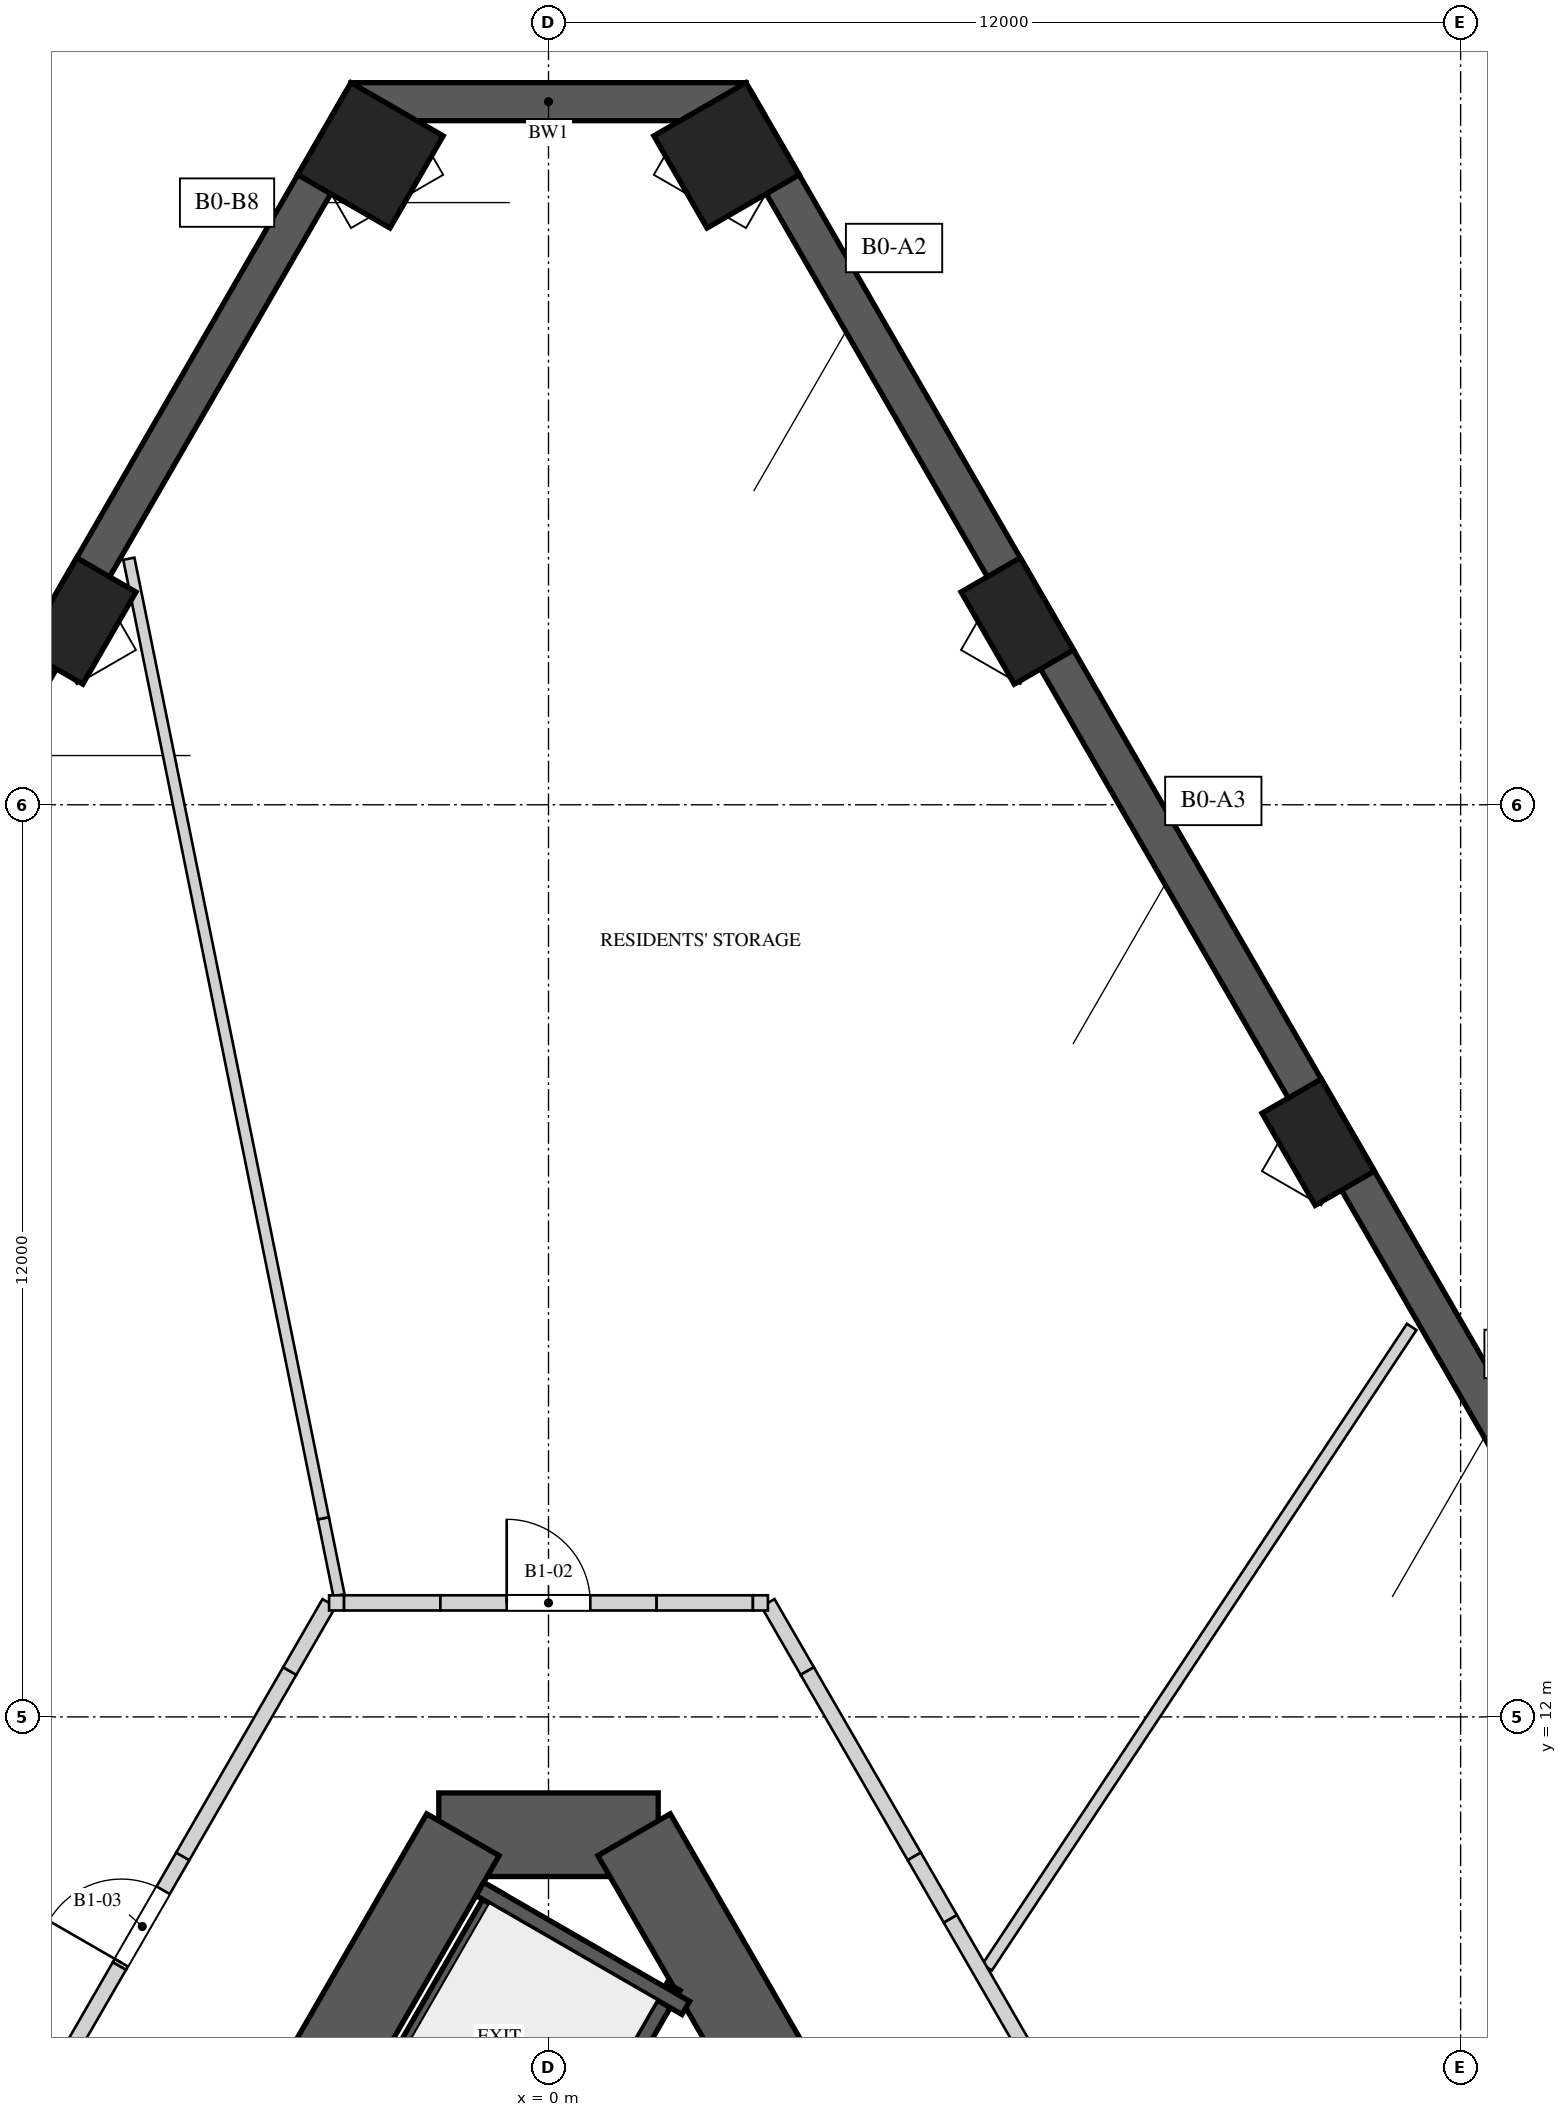
"""IFC4 building model, lengths in metres.
Left out: names, types, materials, properties, quantities, classifications, styles, units other than length and angle.
Written with IfcOpenShell. Run it as: python <this file> out.ifc"""

import sys

from ifc_helpers import new_model, si_unit, direction, frame, frame_2d, origin, origin_2d, place, context, subcontext, project, spatial, polyline, rectangle, outline, extrude, element, fill, save


model = new_model("IFC4")
c1 = context("Model", 3, precision=1e-05, world=origin(), true_north=direction((0.0, 1.0)))
c2 = subcontext(c1, "Body", "Model", "MODEL_VIEW")
j1 = project(units=[si_unit("LENGTHUNIT", "METRE"), si_unit("PLANEANGLEUNIT", "RADIAN")], contexts=[c1])
p1 = place(None, origin())
s1 = spatial("IfcSite", under=j1, at=p1, CompositionType="ELEMENT")
p2 = place(p1, origin())
s2 = spatial("IfcBuilding", under=s1, at=p2, CompositionType="ELEMENT")
p3 = place(p2, frame((0.0, 0.0, -5.0)))
s3 = spatial("IfcBuildingStorey", under=s2, at=p3, CompositionType="ELEMENT", Elevation=-5.0)
p4 = place(p3, frame((2.598, 33.25, -0.3), z_axis=(0.0, 0.0, 1.0), x_axis=(-1.0, 0.0, 0.0)))
e1 = element("IfcWall", 1, at=p4, inside=s3, PredefinedType="SHEAR", context=c2, shape_type="SweptSolid", body=[
    extrude(rectangle(XDim=5.196, YDim=0.5, at=frame_2d((2.598, 0.0))), origin(), (0.0, 0.0, 1.0), 5.3),
])
for number, where, z_axis, x_axis in (
    (2, (-2.454, 33.25, -0.3), (0.0, 0.0, 1.0), (-0.5, -0.866, 0.0)),
    (3, (30.022, -14.5, -0.3), (0.0, 0.0, 1.0), (-0.5, 0.866, 0.0)),
):
    element("IfcWall", number, at=place(p3, frame(where, z_axis=z_axis, x_axis=x_axis)), inside=s3, PredefinedType="SHEAR", context=c2, shape_type="SweptSolid", body=[
        extrude(rectangle(XDim=55.137, YDim=0.5, at=frame_2d((27.568, 0.0))), origin(), (0.0, 0.0, 1.0), 5.3),
    ])
p5 = place(p3, frame((1.443, 10.45, -0.3), z_axis=(0.0, 0.0, 1.0), x_axis=(-1.0, 0.0, 0.0)))
e4 = element("IfcWall", 4, at=p5, inside=s3, PredefinedType="SHEAR", context=c2, shape_type="SweptSolid", body=[
    extrude(rectangle(XDim=2.887, YDim=1.1, at=frame_2d((1.443, 0.0))), origin(), (0.0, 0.0, 1.0), 5.3),
])
p6 = place(p3, frame((-1.126, 10.45, -0.3), z_axis=(0.0, 0.0, 1.0), x_axis=(-0.500001757713, -0.866024388966, 0.0)))
e5 = element("IfcWall", 5, at=p6, inside=s3, PredefinedType="SHEAR", context=c2, shape_type="SweptSolid", body=[
    extrude(rectangle(XDim=16.974, YDim=1.1, at=frame_2d((8.487, 0.0))), origin(), (0.0, 0.0, 1.0), 5.3),
])
p7 = place(p6, frame((6.692, 0.0, 0.3)))
e6 = element("IfcOpeningElement", 6, at=p7, cuts=e5, PredefinedType="OPENING", context=c2, shape_type="SweptSolid", body=[
    extrude(rectangle(XDim=1.0, YDim=2.4, at=frame_2d((0.5, 1.2))), frame((0.0, 0.56, 0.0), z_axis=(0.0, -1.0, 0.0), x_axis=(1.0, 0.0, 0.0)), (0.0, 0.0, 1.0), 1.12),
])
p8 = place(p6, frame((14.397, 0.0, 0.3)))
e7 = element("IfcOpeningElement", 7, at=p8, cuts=e5, PredefinedType="OPENING", context=c2, shape_type="SweptSolid", body=[
    extrude(rectangle(XDim=0.8, YDim=2.1, at=frame_2d((0.4, 1.05))), frame((0.0, 0.56, 0.0), z_axis=(0.0, -1.0, 0.0), x_axis=(1.0, 0.0, 0.0)), (0.0, 0.0, 1.0), 1.12),
])
p9 = place(p3, frame((9.613, -4.25, -0.3), z_axis=(0.0, 0.0, 1.0), x_axis=(-0.500001757713, 0.866024388966, 0.0)))
e8 = element("IfcWall", 8, at=p9, inside=s3, PredefinedType="SHEAR", context=c2, shape_type="SweptSolid", body=[
    extrude(rectangle(XDim=16.974, YDim=1.1, at=frame_2d((8.487, 0.0))), origin(), (0.0, 0.0, 1.0), 5.3),
])
p10 = place(p9, frame((6.762, 0.0, 0.3)))
e9 = element("IfcOpeningElement", 9, at=p10, cuts=e8, PredefinedType="OPENING", context=c2, shape_type="SweptSolid", body=[
    extrude(rectangle(XDim=1.0, YDim=2.4, at=frame_2d((0.5, 1.2))), frame((0.0, 0.56, 0.0), z_axis=(0.0, -1.0, 0.0), x_axis=(1.0, 0.0, 0.0)), (0.0, 0.0, 1.0), 1.12),
])
p11 = place(p3, frame((-2.342, 32.544, -0.3), z_axis=(0.0, 0.0, 1.0), x_axis=(-0.5, -0.866025403784, 0.0)))
e10 = element("IfcColumn", 10, at=p11, inside=s3, PredefinedType="COLUMN", context=c2, shape_type="SweptSolid", body=[
    extrude(rectangle(XDim=1.4, YDim=1.4, at=origin_2d()), origin(), (0.0, 0.0, 1.0), 5.3),
])
for number, where, z_axis, x_axis in (
    (11, (-6.167, 26.418, -0.3), (0.0, 0.0, 1.0), (-0.5, -0.866, 0.0)),
    (12, (10.126, 19.561, -0.3), (0.0, 0.0, 1.0), (-0.5, 0.866, 0.0)),
    (13, (6.167, 26.418, -0.3), (0.0, 0.0, 1.0), (-0.5, 0.866, 0.0)),
):
    element("IfcColumn", number, at=place(p3, frame(where, z_axis=z_axis, x_axis=x_axis)), inside=s3, PredefinedType="COLUMN", context=c2, shape_type="SweptSolid", body=[
        extrude(rectangle(XDim=1.4, YDim=0.9, at=origin_2d()), origin(), (0.0, 0.0, 1.0), 5.3),
    ])
p12 = place(p3, frame((2.342, 32.544, -0.3), z_axis=(0.0, 0.0, 1.0), x_axis=(-0.5, 0.866025403784, 0.0)))
e14 = element("IfcColumn", 14, at=p12, inside=s3, PredefinedType="COLUMN", context=c2, shape_type="SweptSolid", body=[
    extrude(rectangle(XDim=1.4, YDim=1.4, at=origin_2d()), origin(), (0.0, 0.0, 1.0), 5.3),
])
p13 = place(p3, frame((-0.68, 9.722, 0.0), z_axis=(0.0, 0.0, 1.0), x_axis=(-0.49998037582, -0.866036733513, 0.0)))
e15 = element("IfcWall", 15, at=p13, inside=s3, PredefinedType="SOLIDWALL", context=c2, shape_type="SweptSolid", body=[
    extrude(rectangle(XDim=6.2, YDim=0.2, at=frame_2d((3.1, 0.0))), origin(), (0.0, 0.0, 1.0), 4.65),
])
p14 = place(p3, frame((1.646, 8.45, 0.0), z_axis=(0.0, 0.0, 1.0), x_axis=(-0.500006002103, -0.866021938441, 0.0)))
e16 = element("IfcWall", 16, at=p14, inside=s3, PredefinedType="SOLIDWALL", context=c2, shape_type="SweptSolid", body=[
    extrude(rectangle(XDim=6.261, YDim=0.2, at=frame_2d((3.13, 0.0))), origin(), (0.0, 0.0, 1.0), 4.65),
])
p15 = place(p3, frame((1.806, 8.172, 0.0), z_axis=(0.0, 0.0, 1.0), x_axis=(-0.866054327916, 0.499949898588, 0.0)))
e17 = element("IfcWall", 17, at=p15, inside=s3, PredefinedType="SOLIDWALL", context=c2, shape_type="SweptSolid", body=[
    extrude(rectangle(XDim=3.128, YDim=0.2, at=frame_2d((1.564, 0.0))), origin(), (0.0, 0.0, 1.0), 4.65),
])
p16 = place(p3, frame((-2.757, 13.6, 0.0), z_axis=(0.0, 0.0, 1.0), x_axis=(-0.198613380465, 0.980077917872, 0.0)))
e18 = element("IfcWall", 18, at=p16, inside=s3, PredefinedType="PARTITIONING", context=c2, shape_type="SweptSolid", body=[
    extrude(rectangle(XDim=1.034, YDim=0.15, at=frame_2d((0.517, 0.0))), origin(), (0.0, 0.0, 1.0), 3.55),
])
p17 = place(p3, frame((-2.962, 14.613, 0.0), z_axis=(0.0, 0.0, 1.0), x_axis=(-0.198681618369, 0.980064086947, 0.0)))
e19 = element("IfcWall", 19, at=p17, inside=s3, PredefinedType="PARTITIONING", context=c2, shape_type="SweptSolid", body=[
    extrude(rectangle(XDim=12.88, YDim=0.15, at=frame_2d((6.44, 0.0))), origin(), (0.0, 0.0, 1.0), 4.65),
])
p18 = place(p3, frame((5.771, 8.705, 0.0), z_axis=(0.0, 0.0, 1.0), x_axis=(0.552519064747, 0.833500259802, 0.0)))
e20 = element("IfcWall", 20, at=p18, inside=s3, PredefinedType="PARTITIONING", context=c2, shape_type="SweptSolid", body=[
    extrude(rectangle(XDim=10.109, YDim=0.15, at=frame_2d((5.054, 0.0))), origin(), (0.0, 0.0, 1.0), 4.65),
])
p19 = place(p3, frame((2.887, 13.5, 0.0), z_axis=(0.0, 0.0, 1.0), x_axis=(0.499994660107, -0.866028486751, 0.0)))
e21 = element("IfcWall", 21, at=p19, inside=s3, PredefinedType="SOLIDWALL", context=c2, shape_type="SweptSolid", body=[
    extrude(rectangle(XDim=1.035, YDim=0.2, at=frame_2d((0.518, 0.0))), origin(), (0.0, 0.0, 1.0), 3.55),
])
p20 = place(p3, frame((3.404, 12.604, 0.0), z_axis=(0.0, 0.0, 1.0), x_axis=(0.500000186108, -0.866025296335, 0.0)))
e22 = element("IfcWall", 22, at=p20, inside=s3, PredefinedType="SOLIDWALL", context=c2, shape_type="SweptSolid", body=[
    extrude(rectangle(XDim=2.815, YDim=0.2, at=frame_2d((1.408, 0.0))), origin(), (0.0, 0.0, 1.0), 4.65),
])
p21 = place(p3, frame((4.812, 10.165, 0.0), z_axis=(0.0, 0.0, 1.0), x_axis=(0.500174821557, -0.865924446982, 0.0)))
e23 = element("IfcWall", 23, at=p21, inside=s3, PredefinedType="SOLIDWALL", context=c2, shape_type="SweptSolid", body=[
    extrude(rectangle(XDim=0.95, YDim=0.2, at=frame_2d((0.475, 0.0))), origin(), (0.0, 0.0, 1.0), 3.75),
])
p22 = place(p3, frame((5.287, 9.343, 0.0), z_axis=(0.0, 0.0, 1.0), x_axis=(0.499952348839, -0.866052913447, 0.0)))
e24 = element("IfcWall", 24, at=p22, inside=s3, PredefinedType="SOLIDWALL", context=c2, shape_type="SweptSolid", body=[
    extrude(rectangle(XDim=3.064, YDim=0.2, at=frame_2d((1.532, 0.0))), origin(), (0.0, 0.0, 1.0), 4.65),
])
p23 = place(p3, frame((-6.819, 6.689, 0.0), z_axis=(0.0, 0.0, 1.0), x_axis=(0.499995339376, 0.86602809458, 0.0)))
e25 = element("IfcWall", 25, at=p23, inside=s3, PredefinedType="SOLIDWALL", context=c2, shape_type="SweptSolid", body=[
    extrude(rectangle(XDim=2.349, YDim=0.2, at=frame_2d((1.175, 0.0))), origin(), (0.0, 0.0, 1.0), 4.65),
])
p24 = place(p3, frame((-5.645, 8.723, 0.0), z_axis=(0.0, 0.0, 1.0), x_axis=(0.500018619731, 0.866014653411, 0.0)))
e26 = element("IfcWall", 26, at=p24, inside=s3, PredefinedType="SOLIDWALL", context=c2, shape_type="SweptSolid", body=[
    extrude(outline(polyline([(0.0, 0.0), (1.665, 0.0), (1.665, 3.75), (0.715, 3.75), (0.715, 4.65), (0.0, 4.65), (0.0, 0.0)])), frame((0.0, 0.1, 0.0), z_axis=(0.0, -1.0, 0.0), x_axis=(1.0, 0.0, 0.0)), (0.0, 0.0, 1.0), 0.2),
])
p25 = place(p24, frame((0.05, 0.0, 0.0)))
e27 = element("IfcOpeningElement", 27, at=p25, cuts=e26, PredefinedType="OPENING", context=c2, shape_type="SweptSolid", body=[
    extrude(rectangle(XDim=1.1, YDim=2.4, at=frame_2d((0.55, 1.2))), frame((0.0, 0.11, 0.0), z_axis=(0.0, -1.0, 0.0), x_axis=(1.0, 0.0, 0.0)), (0.0, 0.0, 1.0), 0.22),
])
p26 = place(p3, frame((-4.812, 10.165, 0.0), z_axis=(0.0, 0.0, 1.0), x_axis=(0.500000186108, 0.866025296335, 0.0)))
e28 = element("IfcWall", 28, at=p26, inside=s3, PredefinedType="SOLIDWALL", context=c2, shape_type="SweptSolid", body=[
    extrude(rectangle(XDim=2.815, YDim=0.2, at=frame_2d((1.408, 0.0))), origin(), (0.0, 0.0, 1.0), 4.65),
])
p27 = place(p3, frame((-3.404, 12.604, 0.0), z_axis=(0.0, 0.0, 1.0), x_axis=(0.499994660107, 0.866028486751, 0.0)))
e29 = element("IfcWall", 29, at=p27, inside=s3, PredefinedType="SOLIDWALL", context=c2, shape_type="SweptSolid", body=[
    extrude(rectangle(XDim=1.035, YDim=0.2, at=frame_2d((0.518, 0.0))), origin(), (0.0, 0.0, 1.0), 3.55),
])
p28 = place(p3, frame((-2.887, 13.5, 0.0), z_axis=(0.0, 0.0, 1.0), x_axis=(1.0, 0.0, 0.0)))
e30 = element("IfcWall", 30, at=p28, inside=s3, PredefinedType="SOLIDWALL", context=c2, shape_type="SweptSolid", body=[
    extrude(rectangle(XDim=0.197, YDim=0.2, at=frame_2d((0.099, 0.0))), origin(), (0.0, 0.0, 1.0), 3.55),
])
p29 = place(p3, frame((-2.689, 13.5, 0.0), z_axis=(0.0, 0.0, 1.0), x_axis=(1.0, 0.0, 0.0)))
e31 = element("IfcWall", 31, at=p29, inside=s3, PredefinedType="SOLIDWALL", context=c2, shape_type="SweptSolid", body=[
    extrude(rectangle(XDim=1.267, YDim=0.2, at=frame_2d((0.633, 0.0))), origin(), (0.0, 0.0, 1.0), 4.65),
])
p30 = place(p3, frame((-1.423, 13.5, 0.0), z_axis=(0.0, 0.0, 1.0), x_axis=(1.0, 0.0, 0.0)))
e32 = element("IfcWall", 32, at=p30, inside=s3, PredefinedType="SOLIDWALL", context=c2, shape_type="SweptSolid", body=[
    extrude(outline(polyline([(0.0, 0.0), (2.845, 0.0), (2.845, 3.55), (1.943, 3.55), (1.943, 4.65), (0.902, 4.65), (0.902, 3.55), (0.0, 3.55), (0.0, 0.0)])), frame((0.0, 0.1, 0.0), z_axis=(0.0, -1.0, 0.0), x_axis=(1.0, 0.0, 0.0)), (0.0, 0.0, 1.0), 0.2),
])
p31 = place(p30, frame((0.873, 0.0, 0.0)))
e33 = element("IfcOpeningElement", 33, at=p31, cuts=e32, PredefinedType="OPENING", context=c2, shape_type="SweptSolid", body=[
    extrude(rectangle(XDim=1.1, YDim=2.4, at=frame_2d((0.55, 1.2))), frame((0.0, 0.11, 0.0), z_axis=(0.0, -1.0, 0.0), x_axis=(1.0, 0.0, 0.0)), (0.0, 0.0, 1.0), 0.22),
])
p32 = place(p3, frame((1.423, 13.5, 0.0), z_axis=(0.0, 0.0, 1.0), x_axis=(1.0, 0.0, 0.0)))
e34 = element("IfcWall", 34, at=p32, inside=s3, PredefinedType="SOLIDWALL", context=c2, shape_type="SweptSolid", body=[
    extrude(rectangle(XDim=1.267, YDim=0.2, at=frame_2d((0.633, 0.0))), origin(), (0.0, 0.0, 1.0), 4.65),
])
p33 = place(p3, frame((2.689, 13.5, 0.0), z_axis=(0.0, 0.0, 1.0), x_axis=(1.0, 0.0, 0.0)))
e35 = element("IfcWall", 35, at=p33, inside=s3, PredefinedType="SOLIDWALL", context=c2, shape_type="SweptSolid", body=[
    extrude(rectangle(XDim=0.197, YDim=0.2, at=frame_2d((0.099, 0.0))), origin(), (0.0, 0.0, 1.0), 3.55),
])
p34 = place(p31, origin())
e36 = element("IfcDoor", 36, at=p34, inside=s3, OperationType="SINGLE_SWING_RIGHT", PredefinedType="DOOR", context=c2, shape_type="SweptSolid", body=[
    extrude(rectangle(XDim=1.1, YDim=2.4, at=frame_2d((0.55, 1.2))), frame((0.0, 0.025, 0.0), z_axis=(0.0, -1.0, 0.0), x_axis=(1.0, 0.0, 0.0)), (0.0, 0.0, 1.0), 0.05),
])
fill(e33, e36)
p35 = place(p25, origin())
e37 = element("IfcDoor", 37, at=p35, inside=s3, OperationType="SINGLE_SWING_LEFT", PredefinedType="DOOR", context=c2, shape_type="SweptSolid", body=[
    extrude(rectangle(XDim=1.1, YDim=2.4, at=frame_2d((0.55, 1.2))), frame((0.0, 0.025, 0.0), z_axis=(0.0, -1.0, 0.0), x_axis=(1.0, 0.0, 0.0)), (0.0, 0.0, 1.0), 0.05),
])
fill(e27, e37)
save(model, sys.argv[1])
